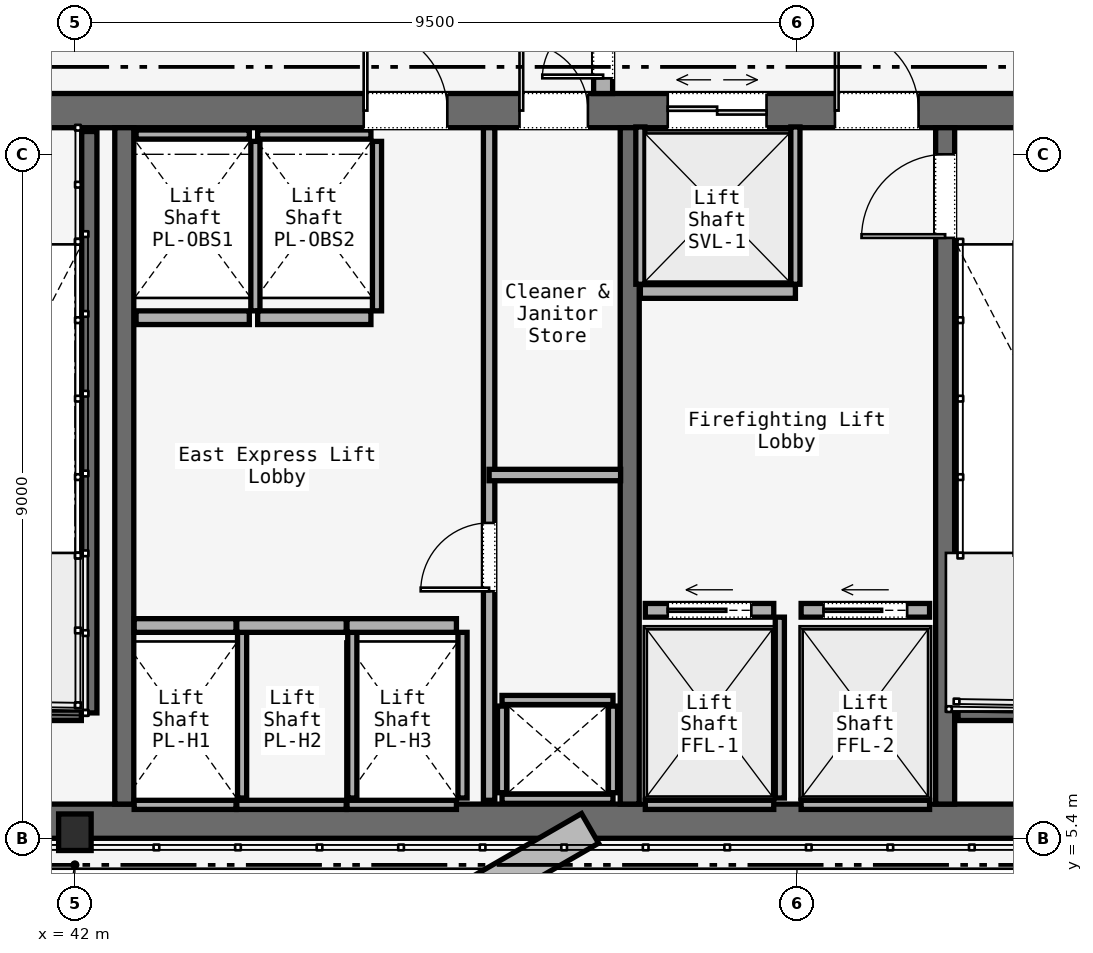
"""IFC4 building model, lengths in metres.
Left out: names, types, materials, properties, quantities, classifications, styles, units other than length and angle.
Written with IfcOpenShell. Run it as: python <this file> out.ifc"""

import sys

from ifc_helpers import new_model, si_unit, direction, frame, frame_2d, origin, origin_2d, place, context, subcontext, project, spatial, rectangle, i_section, extrude, element, fill, save


model = new_model("IFC4")
c1 = context("Model", 3, precision=1e-05, world=origin(), true_north=direction((0.0, 1.0)))
c2 = subcontext(c1, "Body", "Model", "MODEL_VIEW")
j1 = project(units=[si_unit("LENGTHUNIT", "METRE"), si_unit("PLANEANGLEUNIT", "RADIAN")], contexts=[c1])
p1 = place(None, origin())
s1 = spatial("IfcSite", under=j1, at=p1, CompositionType="ELEMENT")
p2 = place(p1, origin())
s2 = spatial("IfcBuilding", under=s1, at=p2, CompositionType="ELEMENT")
p3 = place(p2, frame((0.0, 0.0, 112.0)))
s3 = spatial("IfcBuildingStorey", under=s2, at=p3, CompositionType="ELEMENT", Elevation=112.0)
p4 = place(p3, frame((26.45, 14.975, 0.0), z_axis=(0.0, 0.0, 1.0), x_axis=(1.0, 0.0, 0.0)))
e1 = element("IfcWall", 1, at=p4, inside=s3, PredefinedType="SOLIDWALL", context=c2, shape_type="SweptSolid", body=[
    extrude(rectangle(XDim=31.1, YDim=0.45, at=frame_2d((15.55, 0.0))), origin(), (0.0, 0.0, 1.0), 5.12),
])
p5 = place(p4, frame((1.65, 0.0, 0.0)))
e2 = element("IfcOpeningElement", 2, at=p5, cuts=e1, PredefinedType="OPENING", context=c2, shape_type="SweptSolid", body=[
    extrude(rectangle(XDim=1.1, YDim=2.2, at=frame_2d((0.55, 1.1))), frame((0.0, 0.225, 0.0), z_axis=(0.0, -1.0, 0.0), x_axis=(1.0, 0.0, 0.0)), (0.0, 0.0, 1.0), 0.45),
])
p6 = place(p4, frame((13.65, 0.0, 0.0)))
e3 = element("IfcOpeningElement", 3, at=p6, cuts=e1, PredefinedType="OPENING", context=c2, shape_type="SweptSolid", body=[
    extrude(rectangle(XDim=1.1, YDim=2.2, at=frame_2d((0.55, 1.1))), frame((0.0, 0.225, 0.0), z_axis=(0.0, -1.0, 0.0), x_axis=(1.0, 0.0, 0.0)), (0.0, 0.0, 1.0), 0.45),
])
p7 = place(p4, frame((25.55, 0.0, 0.0)))
e4 = element("IfcOpeningElement", 4, at=p7, cuts=e1, PredefinedType="OPENING", context=c2, shape_type="SweptSolid", body=[
    extrude(rectangle(XDim=1.1, YDim=2.2, at=frame_2d((0.55, 1.1))), frame((0.0, 0.225, 0.0), z_axis=(0.0, -1.0, 0.0), x_axis=(1.0, 0.0, 0.0)), (0.0, 0.0, 1.0), 0.45),
])
p8 = place(p4, frame((10.7, 0.0, 0.0)))
e5 = element("IfcOpeningElement", 5, at=p8, cuts=e1, PredefinedType="OPENING", context=c2, shape_type="SweptSolid", body=[
    extrude(rectangle(XDim=1.4, YDim=2.2, at=frame_2d((0.7, 1.1))), frame((0.0, 0.225, 0.0), z_axis=(0.0, -1.0, 0.0), x_axis=(1.0, 0.0, 0.0)), (0.0, 0.0, 1.0), 0.45),
])
p9 = place(p4, frame((19.35, 0.0, 0.0)))
e6 = element("IfcOpeningElement", 6, at=p9, cuts=e1, PredefinedType="OPENING", context=c2, shape_type="SweptSolid", body=[
    extrude(rectangle(XDim=1.1, YDim=2.2, at=frame_2d((0.55, 1.1))), frame((0.0, 0.225, 0.0), z_axis=(0.0, -1.0, 0.0), x_axis=(1.0, 0.0, 0.0)), (0.0, 0.0, 1.0), 0.45),
])
p10 = place(p4, frame((21.4, 0.0, 0.0)))
e7 = element("IfcOpeningElement", 7, at=p10, cuts=e1, PredefinedType="OPENING", context=c2, shape_type="SweptSolid", body=[
    extrude(rectangle(XDim=0.9, YDim=2.1, at=frame_2d((0.45, 1.05))), frame((0.0, 0.225, 0.0), z_axis=(0.0, -1.0, 0.0), x_axis=(1.0, 0.0, 0.0)), (0.0, 0.0, 1.0), 0.45),
])
p11 = place(p4, frame((23.35, 0.0, 0.0)))
e8 = element("IfcOpeningElement", 8, at=p11, cuts=e1, PredefinedType="OPENING", context=c2, shape_type="SweptSolid", body=[
    extrude(rectangle(XDim=1.3, YDim=2.3, at=frame_2d((0.65, 1.15))), frame((0.0, 0.225, 0.0), z_axis=(0.0, -1.0, 0.0), x_axis=(1.0, 0.0, 0.0)), (0.0, 0.0, 1.0), 0.45),
])
p12 = place(p3, frame((26.45, 5.625, 0.0), z_axis=(0.0, 0.0, 1.0), x_axis=(1.0, 0.0, 0.0)))
e9 = element("IfcWall", 9, at=p12, inside=s3, PredefinedType="SOLIDWALL", context=c2, shape_type="SweptSolid", body=[
    extrude(rectangle(XDim=31.1, YDim=0.45, at=frame_2d((15.55, 0.0))), origin(), (0.0, 0.0, 1.0), 5.12),
])
for number, where, z_axis, x_axis in (
    (10, (42.65, 5.85, 0.0), (0.0, 0.0, 1.0), (0.0, 1.0, 0.0)),
    (11, (49.3, 5.85, 0.0), (0.0, 0.0, 1.0), (0.0, 1.0, 0.0)),
):
    element("IfcWall", number, at=place(p3, frame(where, z_axis=z_axis, x_axis=x_axis)), inside=s3, PredefinedType="SOLIDWALL", context=c2, shape_type="SweptSolid", body=[
        extrude(rectangle(XDim=8.9, YDim=0.25, at=frame_2d((4.45, 0.0))), origin(), (0.0, 0.0, 1.0), 5.12),
    ])
p13 = place(p3, frame((53.45, 5.85, 0.0), z_axis=(0.0, 0.0, 1.0), x_axis=(0.0, 1.0, 0.0)))
e12 = element("IfcWall", 12, at=p13, inside=s3, PredefinedType="SOLIDWALL", context=c2, shape_type="SweptSolid", body=[
    extrude(rectangle(XDim=8.9, YDim=0.25, at=frame_2d((4.45, 0.0))), origin(), (0.0, 0.0, 1.0), 5.12),
])
p14 = place(p13, frame((7.45, 0.0, 0.0)))
e13 = element("IfcOpeningElement", 13, at=p14, cuts=e12, PredefinedType="OPENING", context=c2, shape_type="SweptSolid", body=[
    extrude(rectangle(XDim=1.1, YDim=2.2, at=frame_2d((0.55, 1.1))), frame((0.0, 0.125, 0.0), z_axis=(0.0, -1.0, 0.0), x_axis=(1.0, 0.0, 0.0)), (0.0, 0.0, 1.0), 0.25),
])
p15 = place(p3, frame((42.0, 5.48, 0.0), z_axis=(0.0, 0.0, 1.0), x_axis=(1.0, 0.0, 0.0)))
e14 = element("IfcColumn", 14, at=p15, inside=s3, PredefinedType="COLUMN", context=c2, shape_type="SweptSolid", body=[
    extrude(i_section(OverallWidth=0.428, OverallDepth=0.481, WebThickness=0.051, FlangeThickness=0.065, FilletRadius=0.015, at=origin_2d()), origin(), (0.0, 0.0, 1.0), 5.12),
])
p16 = place(p3, frame((48.95, 15.2, 0.0), z_axis=(0.0, 0.0, 1.0), x_axis=(0.0, 1.0, 0.0)))
e15 = element("IfcWall", 15, at=p16, inside=s3, PredefinedType="SOLIDWALL", context=c2, shape_type="SweptSolid", body=[
    extrude(rectangle(XDim=19.8, YDim=0.25, at=frame_2d((9.9, 0.0))), origin(), (0.0, 0.0, 1.0), 3.99),
])
p17 = place(p16, frame((0.2, 0.0, 0.0)))
e16 = element("IfcOpeningElement", 16, at=p17, cuts=e15, PredefinedType="OPENING", context=c2, shape_type="SweptSolid", body=[
    extrude(rectangle(XDim=1.6, YDim=2.3, at=frame_2d((0.8, 1.15))), frame((0.0, 0.125, 0.0), z_axis=(0.0, -1.0, 0.0), x_axis=(1.0, 0.0, 0.0)), (0.0, 0.0, 1.0), 0.25),
])
p18 = place(p3, frame((42.19, 14.7, 0.0), z_axis=(0.0, 0.0, 1.0), x_axis=(0.0, -1.0, 0.0)))
e17 = element("IfcWall", 17, at=p18, inside=s3, PredefinedType="SOLIDWALL", context=c2, shape_type="SweptSolid", body=[
    extrude(rectangle(XDim=7.65, YDim=0.2, at=frame_2d((3.825, 0.0))), origin(), (0.0, 0.0, 1.0), 5.4),
])
for number, where, z_axis, x_axis in (
    (18, (38.97, 7.05, 0.0), (0.0, 0.0, 1.0), (1.0, 0.0, 0.0)),
    (19, (53.62, 7.05, 0.0), (0.0, 0.0, 1.0), (1.0, 0.0, 0.0)),
):
    element("IfcWall", number, at=place(p3, frame(where, z_axis=z_axis, x_axis=x_axis)), inside=s3, PredefinedType="SOLIDWALL", context=c2, shape_type="SweptSolid", body=[
        extrude(rectangle(XDim=3.115, YDim=0.2, at=frame_2d((1.558, 0.0))), origin(), (0.0, 0.0, 1.0), 5.4),
    ])
for number, where, z_axis, x_axis in (
    (20, (47.62, 5.92, 0.0), (0.0, 0.0, 1.0), (1.0, 0.0, 0.0)),
    (21, (47.62, 7.22, 0.0), (0.0, 0.0, 1.0), (1.0, 0.0, 0.0)),
):
    element("IfcWall", number, at=place(p3, frame(where, z_axis=z_axis, x_axis=x_axis)), inside=s3, PredefinedType="SOLIDWALL", context=c2, shape_type="SweptSolid", body=[
        extrude(rectangle(XDim=1.46, YDim=0.12, at=frame_2d((0.73, 0.0))), origin(), (0.0, 0.0, 1.0), 3.99),
    ])
for number, where, z_axis, x_axis in (
    (22, (47.62, 6.0, 0.0), (0.0, 0.0, 1.0), (0.0, 1.0, 0.0)),
    (23, (49.08, 6.0, 0.0), (0.0, 0.0, 1.0), (0.0, 1.0, 0.0)),
):
    element("IfcWall", number, at=place(p3, frame(where, z_axis=z_axis, x_axis=x_axis)), inside=s3, PredefinedType="SOLIDWALL", context=c2, shape_type="SweptSolid", body=[
        extrude(rectangle(XDim=1.14, YDim=0.12, at=frame_2d((0.57, 0.0))), origin(), (0.0, 0.0, 1.0), 3.99),
    ])
p19 = place(p3, frame((47.45, 5.9, 0.0), z_axis=(0.0, 0.0, 1.0), x_axis=(0.0, 1.0, 0.0)))
e24 = element("IfcWall", 24, at=p19, inside=s3, PredefinedType="PARTITIONING", context=c2, shape_type="SweptSolid", body=[
    extrude(rectangle(XDim=8.85, YDim=0.15, at=frame_2d((4.425, 0.0))), origin(), (0.0, 0.0, 1.0), 3.99),
])
p20 = place(p19, frame((2.75, 0.0, 0.0)))
e25 = element("IfcOpeningElement", 25, at=p20, cuts=e24, PredefinedType="OPENING", context=c2, shape_type="SweptSolid", body=[
    extrude(rectangle(XDim=0.9, YDim=2.1, at=frame_2d((0.45, 1.05))), frame((0.0, 0.075, 0.0), z_axis=(0.0, -1.0, 0.0), x_axis=(1.0, 0.0, 0.0)), (0.0, 0.0, 1.0), 0.15),
])
p21 = place(p3, frame((47.45, 10.18, 0.0), z_axis=(0.0, 0.0, 1.0), x_axis=(1.0, 0.0, 0.0)))
e26 = element("IfcWall", 26, at=p21, inside=s3, PredefinedType="PARTITIONING", context=c2, shape_type="SweptSolid", body=[
    extrude(rectangle(XDim=1.73, YDim=0.15, at=frame_2d((0.865, 0.0))), origin(), (0.0, 0.0, 1.0), 3.99),
])
p22 = place(p3, frame((42.78, 8.2, 0.0), z_axis=(0.0, 0.0, 1.0), x_axis=(1.0, 0.0, 0.0)))
e27 = element("IfcWall", 27, at=p22, inside=s3, PredefinedType="SOLIDWALL", context=c2, shape_type="SweptSolid", body=[
    extrude(rectangle(XDim=1.34, YDim=0.18, at=frame_2d((0.67, 0.0))), origin(), (0.0, 0.0, 1.0), 3.99),
])
p23 = place(p3, frame((42.78, 5.84, 0.0), z_axis=(0.0, 0.0, 1.0), x_axis=(1.0, 0.0, 0.0)))
e28 = element("IfcWall", 28, at=p23, inside=s3, PredefinedType="SOLIDWALL", context=c2, shape_type="SweptSolid", body=[
    extrude(rectangle(XDim=1.34, YDim=0.12, at=frame_2d((0.67, 0.0))), origin(), (0.0, 0.0, 1.0), 3.99),
])
p24 = place(p3, frame((44.2, 5.93, 0.0), z_axis=(0.0, 0.0, 1.0), x_axis=(0.0, 1.0, 0.0)))
e29 = element("IfcWall", 29, at=p24, inside=s3, PredefinedType="SOLIDWALL", context=c2, shape_type="SweptSolid", body=[
    extrude(rectangle(XDim=2.18, YDim=0.12, at=frame_2d((1.09, 0.0))), origin(), (0.0, 0.0, 1.0), 3.99),
])
p25 = place(p3, frame((44.13, 8.2, 0.0), z_axis=(0.0, 0.0, 1.0), x_axis=(1.0, 0.0, 0.0)))
e30 = element("IfcWall", 30, at=p25, inside=s3, PredefinedType="SOLIDWALL", context=c2, shape_type="SweptSolid", body=[
    extrude(rectangle(XDim=1.44, YDim=0.18, at=frame_2d((0.72, 0.0))), origin(), (0.0, 0.0, 1.0), 3.99),
])
p26 = place(p3, frame((44.13, 5.84, 0.0), z_axis=(0.0, 0.0, 1.0), x_axis=(1.0, 0.0, 0.0)))
e31 = element("IfcWall", 31, at=p26, inside=s3, PredefinedType="SOLIDWALL", context=c2, shape_type="SweptSolid", body=[
    extrude(rectangle(XDim=1.44, YDim=0.12, at=frame_2d((0.72, 0.0))), origin(), (0.0, 0.0, 1.0), 3.99),
])
p27 = place(p3, frame((45.65, 5.93, 0.0), z_axis=(0.0, 0.0, 1.0), x_axis=(0.0, 1.0, 0.0)))
e32 = element("IfcWall", 32, at=p27, inside=s3, PredefinedType="SOLIDWALL", context=c2, shape_type="SweptSolid", body=[
    extrude(rectangle(XDim=2.18, YDim=0.12, at=frame_2d((1.09, 0.0))), origin(), (0.0, 0.0, 1.0), 3.99),
])
p28 = place(p3, frame((45.58, 8.2, 0.0), z_axis=(0.0, 0.0, 1.0), x_axis=(1.0, 0.0, 0.0)))
e33 = element("IfcWall", 33, at=p28, inside=s3, PredefinedType="SOLIDWALL", context=c2, shape_type="SweptSolid", body=[
    extrude(rectangle(XDim=1.44, YDim=0.18, at=frame_2d((0.72, 0.0))), origin(), (0.0, 0.0, 1.0), 3.99),
])
p29 = place(p3, frame((45.58, 5.84, 0.0), z_axis=(0.0, 0.0, 1.0), x_axis=(1.0, 0.0, 0.0)))
e34 = element("IfcWall", 34, at=p29, inside=s3, PredefinedType="SOLIDWALL", context=c2, shape_type="SweptSolid", body=[
    extrude(rectangle(XDim=1.44, YDim=0.12, at=frame_2d((0.72, 0.0))), origin(), (0.0, 0.0, 1.0), 3.99),
])
p30 = place(p3, frame((47.1, 5.93, 0.0), z_axis=(0.0, 0.0, 1.0), x_axis=(0.0, 1.0, 0.0)))
e35 = element("IfcWall", 35, at=p30, inside=s3, PredefinedType="SOLIDWALL", context=c2, shape_type="SweptSolid", body=[
    extrude(rectangle(XDim=2.18, YDim=0.12, at=frame_2d((1.09, 0.0))), origin(), (0.0, 0.0, 1.0), 3.99),
])
p31 = place(p3, frame((42.805, 12.25, 0.0), z_axis=(0.0, 0.0, 1.0), x_axis=(1.0, 0.0, 0.0)))
e36 = element("IfcWall", 36, at=p31, inside=s3, PredefinedType="SOLIDWALL", context=c2, shape_type="SweptSolid", body=[
    extrude(rectangle(XDim=1.49, YDim=0.18, at=frame_2d((0.745, 0.0))), origin(), (0.0, 0.0, 1.0), 3.99),
])
p32 = place(p3, frame((42.805, 14.66, 0.0), z_axis=(0.0, 0.0, 1.0), x_axis=(1.0, 0.0, 0.0)))
e37 = element("IfcWall", 37, at=p32, inside=s3, PredefinedType="SOLIDWALL", context=c2, shape_type="SweptSolid", body=[
    extrude(rectangle(XDim=1.49, YDim=0.12, at=frame_2d((0.745, 0.0))), origin(), (0.0, 0.0, 1.0), 3.99),
])
p33 = place(p3, frame((44.375, 12.34, 0.0), z_axis=(0.0, 0.0, 1.0), x_axis=(0.0, 1.0, 0.0)))
e38 = element("IfcWall", 38, at=p33, inside=s3, PredefinedType="SOLIDWALL", context=c2, shape_type="SweptSolid", body=[
    extrude(rectangle(XDim=2.23, YDim=0.12, at=frame_2d((1.115, 0.0))), origin(), (0.0, 0.0, 1.0), 3.99),
])
p34 = place(p3, frame((44.405, 12.25, 0.0), z_axis=(0.0, 0.0, 1.0), x_axis=(1.0, 0.0, 0.0)))
e39 = element("IfcWall", 39, at=p34, inside=s3, PredefinedType="SOLIDWALL", context=c2, shape_type="SweptSolid", body=[
    extrude(rectangle(XDim=1.49, YDim=0.18, at=frame_2d((0.745, 0.0))), origin(), (0.0, 0.0, 1.0), 3.99),
])
p35 = place(p3, frame((44.405, 14.66, 0.0), z_axis=(0.0, 0.0, 1.0), x_axis=(1.0, 0.0, 0.0)))
e40 = element("IfcWall", 40, at=p35, inside=s3, PredefinedType="SOLIDWALL", context=c2, shape_type="SweptSolid", body=[
    extrude(rectangle(XDim=1.49, YDim=0.12, at=frame_2d((0.745, 0.0))), origin(), (0.0, 0.0, 1.0), 3.99),
])
p36 = place(p3, frame((45.975, 12.34, 0.0), z_axis=(0.0, 0.0, 1.0), x_axis=(0.0, 1.0, 0.0)))
e41 = element("IfcWall", 41, at=p36, inside=s3, PredefinedType="SOLIDWALL", context=c2, shape_type="SweptSolid", body=[
    extrude(rectangle(XDim=2.23, YDim=0.12, at=frame_2d((1.115, 0.0))), origin(), (0.0, 0.0, 1.0), 3.99),
])
p37 = place(p3, frame((49.505, 8.4, 0.0), z_axis=(0.0, 0.0, 1.0), x_axis=(1.0, 0.0, 0.0)))
e42 = element("IfcWall", 42, at=p37, inside=s3, PredefinedType="SOLIDWALL", context=c2, shape_type="SweptSolid", body=[
    extrude(rectangle(XDim=1.69, YDim=0.18, at=frame_2d((0.845, 0.0))), origin(), (0.0, 0.0, 1.0), 3.99),
])
p38 = place(p37, frame((0.295, 0.0, 0.0)))
e43 = element("IfcOpeningElement", 43, at=p38, cuts=e42, PredefinedType="OPENING", context=c2, shape_type="SweptSolid", body=[
    extrude(rectangle(XDim=1.1, YDim=2.2, at=frame_2d((0.55, 1.1))), frame((0.0, 0.09, 0.0), z_axis=(0.0, -1.0, 0.0), x_axis=(1.0, 0.0, 0.0)), (0.0, 0.0, 1.0), 0.18),
])
p39 = place(p3, frame((49.505, 5.84, 0.0), z_axis=(0.0, 0.0, 1.0), x_axis=(1.0, 0.0, 0.0)))
e44 = element("IfcWall", 44, at=p39, inside=s3, PredefinedType="SOLIDWALL", context=c2, shape_type="SweptSolid", body=[
    extrude(rectangle(XDim=1.69, YDim=0.12, at=frame_2d((0.845, 0.0))), origin(), (0.0, 0.0, 1.0), 3.99),
])
p40 = place(p3, frame((51.275, 5.93, 0.0), z_axis=(0.0, 0.0, 1.0), x_axis=(0.0, 1.0, 0.0)))
e45 = element("IfcWall", 45, at=p40, inside=s3, PredefinedType="SOLIDWALL", context=c2, shape_type="SweptSolid", body=[
    extrude(rectangle(XDim=2.38, YDim=0.12, at=frame_2d((1.19, 0.0))), origin(), (0.0, 0.0, 1.0), 3.99),
])
p41 = place(p3, frame((51.555, 8.4, 0.0), z_axis=(0.0, 0.0, 1.0), x_axis=(1.0, 0.0, 0.0)))
e46 = element("IfcWall", 46, at=p41, inside=s3, PredefinedType="SOLIDWALL", context=c2, shape_type="SweptSolid", body=[
    extrude(rectangle(XDim=1.69, YDim=0.18, at=frame_2d((0.845, 0.0))), origin(), (0.0, 0.0, 1.0), 3.99),
])
p42 = place(p41, frame((0.295, 0.0, 0.0)))
e47 = element("IfcOpeningElement", 47, at=p42, cuts=e46, PredefinedType="OPENING", context=c2, shape_type="SweptSolid", body=[
    extrude(rectangle(XDim=1.1, YDim=2.2, at=frame_2d((0.55, 1.1))), frame((0.0, 0.09, 0.0), z_axis=(0.0, -1.0, 0.0), x_axis=(1.0, 0.0, 0.0)), (0.0, 0.0, 1.0), 0.18),
])
p43 = place(p3, frame((51.555, 5.84, 0.0), z_axis=(0.0, 0.0, 1.0), x_axis=(1.0, 0.0, 0.0)))
e48 = element("IfcWall", 48, at=p43, inside=s3, PredefinedType="SOLIDWALL", context=c2, shape_type="SweptSolid", body=[
    extrude(rectangle(XDim=1.69, YDim=0.12, at=frame_2d((0.845, 0.0))), origin(), (0.0, 0.0, 1.0), 3.99),
])
p44 = place(p3, frame((49.44, 12.595, 0.0), z_axis=(0.0, 0.0, 1.0), x_axis=(1.0, 0.0, 0.0)))
e49 = element("IfcWall", 49, at=p44, inside=s3, PredefinedType="SOLIDWALL", context=c2, shape_type="SweptSolid", body=[
    extrude(rectangle(XDim=2.04, YDim=0.18, at=frame_2d((1.02, 0.0))), origin(), (0.0, 0.0, 1.0), 3.99),
])
for number, where, z_axis, x_axis in (
    (50, (49.44, 12.69, 0.0), (0.0, 0.0, 1.0), (0.0, 1.0, 0.0)),
    (51, (51.48, 12.69, 0.0), (0.0, 0.0, 1.0), (0.0, 1.0, 0.0)),
):
    element("IfcWall", number, at=place(p3, frame(where, z_axis=z_axis, x_axis=x_axis)), inside=s3, PredefinedType="SOLIDWALL", context=c2, shape_type="SweptSolid", body=[
        extrude(rectangle(XDim=2.07, YDim=0.12, at=frame_2d((1.035, 0.0))), origin(), (0.0, 0.0, 1.0), 3.99),
    ])
p45 = place(p17, origin())
e52 = element("IfcDoor", 52, at=p45, inside=s3, OperationType="DOUBLE_DOOR_SINGLE_SWING", PredefinedType="DOOR", context=c2, shape_type="SweptSolid", body=[
    extrude(rectangle(XDim=1.6, YDim=2.3, at=frame_2d((0.8, 1.15))), frame((0.0, 0.025, 0.0), z_axis=(0.0, -1.0, 0.0), x_axis=(1.0, 0.0, 0.0)), (0.0, 0.0, 1.0), 0.05),
])
fill(e16, e52)
p46 = place(p7, origin())
e53 = element("IfcDoor", 53, at=p46, inside=s3, OperationType="SINGLE_SWING_RIGHT", PredefinedType="DOOR", context=c2, shape_type="SweptSolid", body=[
    extrude(rectangle(XDim=1.1, YDim=2.2, at=frame_2d((0.55, 1.1))), frame((0.0, 0.025, 0.0), z_axis=(0.0, -1.0, 0.0), x_axis=(1.0, 0.0, 0.0)), (0.0, 0.0, 1.0), 0.05),
])
fill(e4, e53)
p47 = place(p9, origin())
e54 = element("IfcDoor", 54, at=p47, inside=s3, OperationType="SINGLE_SWING_LEFT", PredefinedType="DOOR", context=c2, shape_type="SweptSolid", body=[
    extrude(rectangle(XDim=1.1, YDim=2.2, at=frame_2d((0.55, 1.1))), frame((0.0, 0.025, 0.0), z_axis=(0.0, -1.0, 0.0), x_axis=(1.0, 0.0, 0.0)), (0.0, 0.0, 1.0), 0.05),
])
fill(e6, e54)
p48 = place(p10, origin())
e55 = element("IfcDoor", 55, at=p48, inside=s3, OperationType="SINGLE_SWING_LEFT", PredefinedType="DOOR", context=c2, shape_type="SweptSolid", body=[
    extrude(rectangle(XDim=0.9, YDim=2.1, at=frame_2d((0.45, 1.05))), frame((0.0, 0.025, 0.0), z_axis=(0.0, -1.0, 0.0), x_axis=(1.0, 0.0, 0.0)), (0.0, 0.0, 1.0), 0.05),
])
fill(e7, e55)
p49 = place(p14, origin())
e56 = element("IfcDoor", 56, at=p49, inside=s3, OperationType="SINGLE_SWING_LEFT", PredefinedType="DOOR", context=c2, shape_type="SweptSolid", body=[
    extrude(rectangle(XDim=1.1, YDim=2.2, at=frame_2d((0.55, 1.1))), frame((0.0, 0.025, 0.0), z_axis=(0.0, -1.0, 0.0), x_axis=(1.0, 0.0, 0.0)), (0.0, 0.0, 1.0), 0.05),
])
fill(e13, e56)
p50 = place(p20, origin())
e57 = element("IfcDoor", 57, at=p50, inside=s3, OperationType="SINGLE_SWING_RIGHT", PredefinedType="DOOR", context=c2, shape_type="SweptSolid", body=[
    extrude(rectangle(XDim=0.9, YDim=2.1, at=frame_2d((0.45, 1.05))), frame((0.0, 0.025, 0.0), z_axis=(0.0, -1.0, 0.0), x_axis=(1.0, 0.0, 0.0)), (0.0, 0.0, 1.0), 0.05),
])
fill(e25, e57)
p51 = place(p38, origin())
e58 = element("IfcDoor", 58, at=p51, inside=s3, OperationType="SLIDING_TO_LEFT", PredefinedType="DOOR", context=c2, shape_type="SweptSolid", body=[
    extrude(rectangle(XDim=1.1, YDim=2.2, at=frame_2d((0.55, 1.1))), frame((0.0, 0.025, 0.0), z_axis=(0.0, -1.0, 0.0), x_axis=(1.0, 0.0, 0.0)), (0.0, 0.0, 1.0), 0.05),
])
fill(e43, e58)
p52 = place(p42, origin())
e59 = element("IfcDoor", 59, at=p52, inside=s3, OperationType="SLIDING_TO_LEFT", PredefinedType="DOOR", context=c2, shape_type="SweptSolid", body=[
    extrude(rectangle(XDim=1.1, YDim=2.2, at=frame_2d((0.55, 1.1))), frame((0.0, 0.025, 0.0), z_axis=(0.0, -1.0, 0.0), x_axis=(1.0, 0.0, 0.0)), (0.0, 0.0, 1.0), 0.05),
])
fill(e47, e59)
p53 = place(p11, origin())
e60 = element("IfcDoor", 60, at=p53, inside=s3, OperationType="DOUBLE_DOOR_SLIDING", PredefinedType="DOOR", context=c2, shape_type="SweptSolid", body=[
    extrude(rectangle(XDim=1.3, YDim=2.3, at=frame_2d((0.65, 1.15))), frame((0.0, 0.025, 0.0), z_axis=(0.0, -1.0, 0.0), x_axis=(1.0, 0.0, 0.0)), (0.0, 0.0, 1.0), 0.05),
])
fill(e8, e60)
save(model, sys.argv[1])
